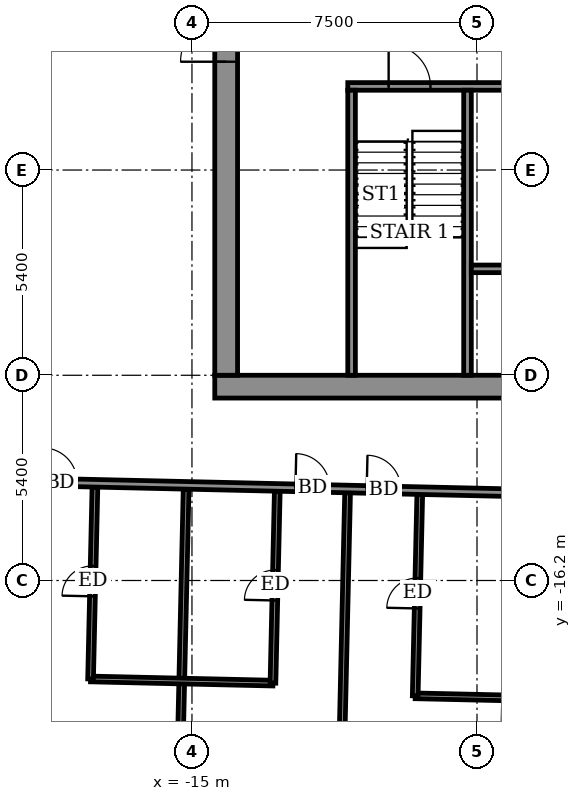
"""IFC4 building model, lengths in metres.
Left out: names, types, materials, properties, quantities, classifications, styles, units other than length and angle.
Written with IfcOpenShell. Run it as: python <this file> out.ifc"""

import sys

from ifc_helpers import new_model, si_unit, direction, frame, frame_2d, origin, place, context, subcontext, project, spatial, rectangle, extrude, element, fill, save


model = new_model("IFC4")
c1 = context("Model", 3, precision=1e-05, world=origin(), true_north=direction((0.0, 1.0)))
c2 = subcontext(c1, "Body", "Model", "MODEL_VIEW")
j1 = project(units=[si_unit("LENGTHUNIT", "METRE"), si_unit("PLANEANGLEUNIT", "RADIAN")], contexts=[c1])
p1 = place(None, origin())
s1 = spatial("IfcSite", under=j1, at=p1, CompositionType="ELEMENT")
p2 = place(p1, origin())
s2 = spatial("IfcBuilding", under=s1, at=p2, CompositionType="ELEMENT")
p3 = place(p2, frame((0.0, 0.0, 306.1)))
s3 = spatial("IfcBuildingStorey", under=s2, at=p3, CompositionType="ELEMENT", Elevation=306.1)
p4 = place(p3, frame((-15.414, -25.244, 0.0), z_axis=(0.0, 0.0, 1.0), x_axis=(0.022706391805, 0.999742176649, 0.0)))
e1 = element("IfcWall", 1, at=p4, inside=s3, PredefinedType="PARTITIONING", context=c2, shape_type="SweptSolid", body=[
    extrude(rectangle(XDim=11.451, YDim=0.15, at=frame_2d((5.726, 0.0))), origin(), (0.0, 0.0, 1.0), 2.5),
])
p5 = place(p3, frame((-11.165, -25.34, 0.0), z_axis=(0.0, 0.0, 1.0), x_axis=(0.022708327922, 0.999742132674, 0.0)))
e2 = element("IfcWall", 2, at=p5, inside=s3, PredefinedType="PARTITIONING", context=c2, shape_type="SweptSolid", body=[
    extrude(rectangle(XDim=11.45, YDim=0.15, at=frame_2d((5.725, 0.0))), origin(), (0.0, 0.0, 1.0), 2.5),
])
p6 = place(p3, frame((-6.866, -25.438, 0.0), z_axis=(0.0, 0.0, 1.0), x_axis=(0.022706391805, 0.999742176649, 0.0)))
e3 = element("IfcWall", 3, at=p6, inside=s3, PredefinedType="PARTITIONING", context=c2, shape_type="SweptSolid", body=[
    extrude(rectangle(XDim=11.451, YDim=0.15, at=frame_2d((5.726, 0.0))), origin(), (0.0, 0.0, 1.0), 2.5),
])
p7 = place(p3, frame((-9.126, -19.235, 0.0), z_axis=(0.0, 0.0, 1.0), x_axis=(0.999749954681, -0.022361308448, 0.0)))
e4 = element("IfcWall", 4, at=p7, inside=s3, PredefinedType="PARTITIONING", context=c2, shape_type="SweptSolid", body=[
    extrude(rectangle(XDim=2.325, YDim=0.15, at=frame_2d((1.163, 0.0))), origin(), (0.0, 0.0, 1.0), 3.05),
])
p8 = place(p3, frame((-9.126, -19.235, 0.0), z_axis=(0.0, 0.0, 1.0), x_axis=(0.022615729912, 0.999744231672, 0.0)))
e5 = element("IfcWall", 5, at=p8, inside=s3, PredefinedType="PARTITIONING", context=c2, shape_type="SweptSolid", body=[
    extrude(rectangle(XDim=5.301, YDim=0.15, at=frame_2d((2.65, 0.0))), origin(), (0.0, 0.0, 1.0), 3.05),
])
p9 = place(p8, frame((2.3, 0.0, 0.0)))
e6 = element("IfcOpeningElement", 6, at=p9, cuts=e5, PredefinedType="OPENING", context=c2, shape_type="SweptSolid", body=[
    extrude(rectangle(XDim=0.8, YDim=2.1, at=frame_2d((0.4, 1.05))), frame((0.0, 0.085, 0.0), z_axis=(0.0, -1.0, 0.0), x_axis=(1.0, 0.0, 0.0)), (0.0, 0.0, 1.0), 0.17),
])
p10 = place(p3, frame((-17.668, -18.791, 0.0), z_axis=(0.0, 0.0, 1.0), x_axis=(0.999742701292, -0.022683280499, 0.0)))
e7 = element("IfcWall", 7, at=p10, inside=s3, PredefinedType="PARTITIONING", context=c2, shape_type="SweptSolid", body=[
    extrude(rectangle(XDim=4.8, YDim=0.15, at=frame_2d((2.4, 0.0))), origin(), (0.0, 0.0, 1.0), 3.05),
])
p11 = place(p3, frame((-17.668, -18.791, 0.0), z_axis=(0.0, 0.0, 1.0), x_axis=(0.022768623305, 0.999740761294, 0.0)))
e8 = element("IfcWall", 8, at=p11, inside=s3, PredefinedType="PARTITIONING", context=c2, shape_type="SweptSolid", body=[
    extrude(rectangle(XDim=5.05, YDim=0.15, at=frame_2d((2.525, 0.0))), origin(), (0.0, 0.0, 1.0), 3.05),
])
p12 = place(p11, frame((2.175, 0.0, 0.0)))
e9 = element("IfcOpeningElement", 9, at=p12, cuts=e8, PredefinedType="OPENING", context=c2, shape_type="SweptSolid", body=[
    extrude(rectangle(XDim=0.8, YDim=2.1, at=frame_2d((0.4, 1.05))), frame((0.0, 0.085, 0.0), z_axis=(0.0, -1.0, 0.0), x_axis=(1.0, 0.0, 0.0)), (0.0, 0.0, 1.0), 0.17),
])
p13 = place(p3, frame((-12.869, -18.9, 0.0), z_axis=(0.0, 0.0, 1.0), x_axis=(0.022576449265, 0.999745119487, 0.0)))
e10 = element("IfcWall", 10, at=p13, inside=s3, PredefinedType="PARTITIONING", context=c2, shape_type="SweptSolid", body=[
    extrude(rectangle(XDim=5.05, YDim=0.15, at=frame_2d((2.525, 0.0))), origin(), (0.0, 0.0, 1.0), 3.05),
])
p14 = place(p13, frame((2.175, 0.0, 0.0)))
e11 = element("IfcOpeningElement", 11, at=p14, cuts=e10, PredefinedType="OPENING", context=c2, shape_type="SweptSolid", body=[
    extrude(rectangle(XDim=0.8, YDim=2.1, at=frame_2d((0.4, 1.05))), frame((0.0, 0.085, 0.0), z_axis=(0.0, -1.0, 0.0), x_axis=(1.0, 0.0, 0.0)), (0.0, 0.0, 1.0), 0.17),
])
p15 = place(p3, frame((-31.347, -13.329, 0.0), z_axis=(0.0, 0.0, 1.0), x_axis=(0.999742613079, -0.022687168058, 0.0)))
e12 = element("IfcWall", 12, at=p15, inside=s3, PredefinedType="PARTITIONING", context=c2, shape_type="SweptSolid", body=[
    extrude(rectangle(XDim=58.799, YDim=0.2, at=frame_2d((29.399, 0.0))), origin(), (0.0, 0.0, 1.0), 3.05),
])
p16 = place(p15, frame((1.35, 0.0, 0.0)))
e13 = element("IfcOpeningElement", 13, at=p16, cuts=e12, PredefinedType="OPENING", context=c2, shape_type="SweptSolid", body=[
    extrude(rectangle(XDim=1.0, YDim=2.1, at=frame_2d((0.5, 1.05))), frame((0.0, 0.11, 0.0), z_axis=(0.0, -1.0, 0.0), x_axis=(1.0, 0.0, 0.0)), (0.0, 0.0, 1.0), 0.22),
])
p17 = place(p15, frame((5.95, 0.0, 0.0)))
e14 = element("IfcOpeningElement", 14, at=p17, cuts=e12, PredefinedType="OPENING", context=c2, shape_type="SweptSolid", body=[
    extrude(rectangle(XDim=0.9, YDim=2.1, at=frame_2d((0.45, 1.05))), frame((0.0, 0.11, 0.0), z_axis=(0.0, -1.0, 0.0), x_axis=(1.0, 0.0, 0.0)), (0.0, 0.0, 1.0), 0.22),
])
p18 = place(p15, frame((10.575, 0.0, 0.0)))
e15 = element("IfcOpeningElement", 15, at=p18, cuts=e12, PredefinedType="OPENING", context=c2, shape_type="SweptSolid", body=[
    extrude(rectangle(XDim=0.9, YDim=2.1, at=frame_2d((0.45, 1.05))), frame((0.0, 0.11, 0.0), z_axis=(0.0, -1.0, 0.0), x_axis=(1.0, 0.0, 0.0)), (0.0, 0.0, 1.0), 0.22),
])
p19 = place(p15, frame((12.425, 0.0, 0.0)))
e16 = element("IfcOpeningElement", 16, at=p19, cuts=e12, PredefinedType="OPENING", context=c2, shape_type="SweptSolid", body=[
    extrude(rectangle(XDim=0.9, YDim=2.1, at=frame_2d((0.45, 1.05))), frame((0.0, 0.11, 0.0), z_axis=(0.0, -1.0, 0.0), x_axis=(1.0, 0.0, 0.0)), (0.0, 0.0, 1.0), 0.22),
])
p20 = place(p15, frame((19.075, 0.0, 0.0)))
e17 = element("IfcOpeningElement", 17, at=p20, cuts=e12, PredefinedType="OPENING", context=c2, shape_type="SweptSolid", body=[
    extrude(rectangle(XDim=0.9, YDim=2.1, at=frame_2d((0.45, 1.05))), frame((0.0, 0.11, 0.0), z_axis=(0.0, -1.0, 0.0), x_axis=(1.0, 0.0, 0.0)), (0.0, 0.0, 1.0), 0.22),
])
p21 = place(p15, frame((20.95, 0.0, 0.0)))
e18 = element("IfcOpeningElement", 18, at=p21, cuts=e12, PredefinedType="OPENING", context=c2, shape_type="SweptSolid", body=[
    extrude(rectangle(XDim=0.9, YDim=2.1, at=frame_2d((0.45, 1.05))), frame((0.0, 0.11, 0.0), z_axis=(0.0, -1.0, 0.0), x_axis=(1.0, 0.0, 0.0)), (0.0, 0.0, 1.0), 0.22),
])
p22 = place(p15, frame((27.625, 0.0, 0.0)))
e19 = element("IfcOpeningElement", 19, at=p22, cuts=e12, PredefinedType="OPENING", context=c2, shape_type="SweptSolid", body=[
    extrude(rectangle(XDim=0.9, YDim=2.1, at=frame_2d((0.45, 1.05))), frame((0.0, 0.11, 0.0), z_axis=(0.0, -1.0, 0.0), x_axis=(1.0, 0.0, 0.0)), (0.0, 0.0, 1.0), 0.22),
])
p23 = place(p15, frame((29.475, 0.0, 0.0)))
e20 = element("IfcOpeningElement", 20, at=p23, cuts=e12, PredefinedType="OPENING", context=c2, shape_type="SweptSolid", body=[
    extrude(rectangle(XDim=0.9, YDim=2.1, at=frame_2d((0.45, 1.05))), frame((0.0, 0.11, 0.0), z_axis=(0.0, -1.0, 0.0), x_axis=(1.0, 0.0, 0.0)), (0.0, 0.0, 1.0), 0.22),
])
p24 = place(p15, frame((36.125, 0.0, 0.0)))
e21 = element("IfcOpeningElement", 21, at=p24, cuts=e12, PredefinedType="OPENING", context=c2, shape_type="SweptSolid", body=[
    extrude(rectangle(XDim=0.9, YDim=2.1, at=frame_2d((0.45, 1.05))), frame((0.0, 0.11, 0.0), z_axis=(0.0, -1.0, 0.0), x_axis=(1.0, 0.0, 0.0)), (0.0, 0.0, 1.0), 0.22),
])
p25 = place(p15, frame((37.95, 0.0, 0.0)))
e22 = element("IfcOpeningElement", 22, at=p25, cuts=e12, PredefinedType="OPENING", context=c2, shape_type="SweptSolid", body=[
    extrude(rectangle(XDim=0.9, YDim=2.1, at=frame_2d((0.45, 1.05))), frame((0.0, 0.11, 0.0), z_axis=(0.0, -1.0, 0.0), x_axis=(1.0, 0.0, 0.0)), (0.0, 0.0, 1.0), 0.22),
])
p26 = place(p15, frame((44.6, 0.0, 0.0)))
e23 = element("IfcOpeningElement", 23, at=p26, cuts=e12, PredefinedType="OPENING", context=c2, shape_type="SweptSolid", body=[
    extrude(rectangle(XDim=0.9, YDim=2.1, at=frame_2d((0.45, 1.05))), frame((0.0, 0.11, 0.0), z_axis=(0.0, -1.0, 0.0), x_axis=(1.0, 0.0, 0.0)), (0.0, 0.0, 1.0), 0.22),
])
p27 = place(p15, frame((46.475, 0.0, 0.0)))
e24 = element("IfcOpeningElement", 24, at=p27, cuts=e12, PredefinedType="OPENING", context=c2, shape_type="SweptSolid", body=[
    extrude(rectangle(XDim=0.9, YDim=2.1, at=frame_2d((0.45, 1.05))), frame((0.0, 0.11, 0.0), z_axis=(0.0, -1.0, 0.0), x_axis=(1.0, 0.0, 0.0)), (0.0, 0.0, 1.0), 0.22),
])
p28 = place(p15, frame((55.925, 0.0, 0.0)))
e25 = element("IfcOpeningElement", 25, at=p28, cuts=e12, PredefinedType="OPENING", context=c2, shape_type="SweptSolid", body=[
    extrude(rectangle(XDim=1.0, YDim=2.1, at=frame_2d((0.5, 1.05))), frame((0.0, 0.11, 0.0), z_axis=(0.0, -1.0, 0.0), x_axis=(1.0, 0.0, 0.0)), (0.0, 0.0, 1.0), 0.22),
])
p29 = place(p15, frame((51.0, 0.0, 0.0)))
e26 = element("IfcOpeningElement", 26, at=p29, cuts=e12, PredefinedType="OPENING", context=c2, shape_type="SweptSolid", body=[
    extrude(rectangle(XDim=0.9, YDim=2.1, at=frame_2d((0.45, 1.05))), frame((0.0, 0.11, 0.0), z_axis=(0.0, -1.0, 0.0), x_axis=(1.0, 0.0, 0.0)), (0.0, 0.0, 1.0), 0.22),
])
p30 = place(p3, frame((-14.4, -11.1, 0.0), z_axis=(0.0, 0.0, 1.0), x_axis=(1.0, 0.0, 0.0)))
e27 = element("IfcWall", 27, at=p30, inside=s3, PredefinedType="SHEAR", context=c2, shape_type="SweptSolid", body=[
    extrude(rectangle(XDim=28.8, YDim=0.6, at=frame_2d((14.4, 0.0))), origin(), (0.0, 0.0, 1.0), 3.6),
])
p31 = place(p3, frame((-14.1, -10.8, 0.0), z_axis=(0.0, 0.0, 1.0), x_axis=(0.0, 1.0, 0.0)))
e28 = element("IfcWall", 28, at=p31, inside=s3, PredefinedType="SHEAR", context=c2, shape_type="SweptSolid", body=[
    extrude(rectangle(XDim=21.6, YDim=0.6, at=frame_2d((10.8, 0.0))), origin(), (0.0, 0.0, 1.0), 3.6),
])
p32 = place(p31, frame((8.25, 0.0, 0.0)))
e29 = element("IfcOpeningElement", 29, at=p32, cuts=e28, PredefinedType="OPENING", context=c2, shape_type="SweptSolid", body=[
    extrude(rectangle(XDim=1.2, YDim=2.1, at=frame_2d((0.6, 1.05))), frame((0.0, 0.31, 0.0), z_axis=(0.0, -1.0, 0.0), x_axis=(1.0, 0.0, 0.0)), (0.0, 0.0, 1.0), 0.62),
])
p33 = place(p31, frame((15.25, 0.0, 0.0)))
e30 = element("IfcOpeningElement", 30, at=p33, cuts=e28, PredefinedType="OPENING", context=c2, shape_type="SweptSolid", body=[
    extrude(rectangle(XDim=1.2, YDim=2.1, at=frame_2d((0.6, 1.05))), frame((0.0, 0.31, 0.0), z_axis=(0.0, -1.0, 0.0), x_axis=(1.0, 0.0, 0.0)), (0.0, 0.0, 1.0), 0.62),
])
p34 = place(p3, frame((-10.9, -3.2, 0.0), z_axis=(0.0, 0.0, 1.0), x_axis=(1.0, 0.0, 0.0)))
e31 = element("IfcWall", 31, at=p34, inside=s3, PredefinedType="SHEAR", context=c2, shape_type="SweptSolid", body=[
    extrude(rectangle(XDim=21.8, YDim=0.2, at=frame_2d((10.9, 0.0))), origin(), (0.0, 0.0, 1.0), 3.05),
])
p35 = place(p34, frame((1.075, 0.0, 0.0)))
e32 = element("IfcOpeningElement", 32, at=p35, cuts=e31, PredefinedType="OPENING", context=c2, shape_type="SweptSolid", body=[
    extrude(rectangle(XDim=1.1, YDim=2.1, at=frame_2d((0.55, 1.05))), frame((0.0, 0.11, 0.0), z_axis=(0.0, -1.0, 0.0), x_axis=(1.0, 0.0, 0.0)), (0.0, 0.0, 1.0), 0.22),
])
p36 = place(p34, frame((10.325, 0.0, 0.0)))
e33 = element("IfcOpeningElement", 33, at=p36, cuts=e31, PredefinedType="OPENING", context=c2, shape_type="SweptSolid", body=[
    extrude(rectangle(XDim=1.1, YDim=2.1, at=frame_2d((0.55, 1.05))), frame((0.0, 0.11, 0.0), z_axis=(0.0, -1.0, 0.0), x_axis=(1.0, 0.0, 0.0)), (0.0, 0.0, 1.0), 0.22),
])
p37 = place(p34, frame((19.625, 0.0, 0.0)))
e34 = element("IfcOpeningElement", 34, at=p37, cuts=e31, PredefinedType="OPENING", context=c2, shape_type="SweptSolid", body=[
    extrude(rectangle(XDim=1.1, YDim=2.1, at=frame_2d((0.55, 1.05))), frame((0.0, 0.11, 0.0), z_axis=(0.0, -1.0, 0.0), x_axis=(1.0, 0.0, 0.0)), (0.0, 0.0, 1.0), 0.22),
])
p38 = place(p34, frame((5.7, 0.0, 0.0)))
e35 = element("IfcOpeningElement", 35, at=p38, cuts=e31, PredefinedType="OPENING", context=c2, shape_type="SweptSolid", body=[
    extrude(rectangle(XDim=1.1, YDim=2.1, at=frame_2d((0.55, 1.05))), frame((0.0, 0.11, 0.0), z_axis=(0.0, -1.0, 0.0), x_axis=(1.0, 0.0, 0.0)), (0.0, 0.0, 1.0), 0.22),
])
p39 = place(p34, frame((14.975, 0.0, 0.0)))
e36 = element("IfcOpeningElement", 36, at=p39, cuts=e31, PredefinedType="OPENING", context=c2, shape_type="SweptSolid", body=[
    extrude(rectangle(XDim=1.1, YDim=2.1, at=frame_2d((0.55, 1.05))), frame((0.0, 0.11, 0.0), z_axis=(0.0, -1.0, 0.0), x_axis=(1.0, 0.0, 0.0)), (0.0, 0.0, 1.0), 0.22),
])
for number, where, z_axis, x_axis in (
    (37, (-10.8, -10.8, 0.0), (0.0, 0.0, 1.0), (0.0, 1.0, 0.0)),
    (38, (-7.75, -10.8, 0.0), (0.0, 0.0, 1.0), (0.0, 1.0, 0.0)),
):
    element("IfcWall", number, at=place(p3, frame(where, z_axis=z_axis, x_axis=x_axis)), inside=s3, PredefinedType="SHEAR", context=c2, shape_type="SweptSolid", body=[
        extrude(rectangle(XDim=7.5, YDim=0.2, at=frame_2d((3.75, 0.0))), origin(), (0.0, 0.0, 1.0), 3.05),
    ])
p40 = place(p3, frame((-7.65, -8.0, 0.0), z_axis=(0.0, 0.0, 1.0), x_axis=(1.0, 0.0, 0.0)))
e39 = element("IfcWall", 39, at=p40, inside=s3, PredefinedType="SHEAR", context=c2, shape_type="SweptSolid", body=[
    extrude(rectangle(XDim=6.0, YDim=0.2, at=frame_2d((3.0, 0.0))), origin(), (0.0, 0.0, 1.0), 3.05),
])
p41 = place(p40, frame((0.9, 0.0, 0.0)))
e40 = element("IfcOpeningElement", 40, at=p41, cuts=e39, PredefinedType="OPENING", context=c2, shape_type="SweptSolid", body=[
    extrude(rectangle(XDim=1.1, YDim=2.1, at=frame_2d((0.55, 1.05))), frame((0.0, 0.11, 0.0), z_axis=(0.0, -1.0, 0.0), x_axis=(1.0, 0.0, 0.0)), (0.0, 0.0, 1.0), 0.22),
])
p42 = place(p40, frame((4.0, 0.0, 0.0)))
e41 = element("IfcOpeningElement", 41, at=p42, cuts=e39, PredefinedType="OPENING", context=c2, shape_type="SweptSolid", body=[
    extrude(rectangle(XDim=1.1, YDim=2.1, at=frame_2d((0.55, 1.05))), frame((0.0, 0.11, 0.0), z_axis=(0.0, -1.0, 0.0), x_axis=(1.0, 0.0, 0.0)), (0.0, 0.0, 1.0), 0.22),
])
p43 = place(p19, origin())
e42 = element("IfcDoor", 42, at=p43, inside=s3, OperationType="SINGLE_SWING_RIGHT", PredefinedType="DOOR", context=c2, shape_type="SweptSolid", body=[
    extrude(rectangle(XDim=0.9, YDim=2.1, at=frame_2d((0.45, 1.05))), frame((0.0, 0.025, 0.0), z_axis=(0.0, -1.0, 0.0), x_axis=(1.0, 0.0, 0.0)), (0.0, 0.0, 1.0), 0.05),
])
fill(e16, e42)
p44 = place(p12, origin())
e43 = element("IfcDoor", 43, at=p44, inside=s3, OperationType="SINGLE_SWING_RIGHT", PredefinedType="DOOR", context=c2, shape_type="SweptSolid", body=[
    extrude(rectangle(XDim=0.8, YDim=2.1, at=frame_2d((0.4, 1.05))), frame((0.0, 0.025, 0.0), z_axis=(0.0, -1.0, 0.0), x_axis=(1.0, 0.0, 0.0)), (0.0, 0.0, 1.0), 0.05),
])
fill(e9, e43)
p45 = place(p20, origin())
e44 = element("IfcDoor", 44, at=p45, inside=s3, OperationType="SINGLE_SWING_LEFT", PredefinedType="DOOR", context=c2, shape_type="SweptSolid", body=[
    extrude(rectangle(XDim=0.9, YDim=2.1, at=frame_2d((0.45, 1.05))), frame((0.0, 0.025, 0.0), z_axis=(0.0, -1.0, 0.0), x_axis=(1.0, 0.0, 0.0)), (0.0, 0.0, 1.0), 0.05),
])
fill(e17, e44)
p46 = place(p14, origin())
e45 = element("IfcDoor", 45, at=p46, inside=s3, OperationType="SINGLE_SWING_LEFT", PredefinedType="DOOR", context=c2, shape_type="SweptSolid", body=[
    extrude(rectangle(XDim=0.8, YDim=2.1, at=frame_2d((0.4, 1.05))), frame((0.0, 0.025, 0.0), z_axis=(0.0, -1.0, 0.0), x_axis=(1.0, 0.0, 0.0)), (0.0, 0.0, 1.0), 0.05),
])
fill(e11, e45)
p47 = place(p21, origin())
e46 = element("IfcDoor", 46, at=p47, inside=s3, OperationType="SINGLE_SWING_RIGHT", PredefinedType="DOOR", context=c2, shape_type="SweptSolid", body=[
    extrude(rectangle(XDim=0.9, YDim=2.1, at=frame_2d((0.45, 1.05))), frame((0.0, 0.025, 0.0), z_axis=(0.0, -1.0, 0.0), x_axis=(1.0, 0.0, 0.0)), (0.0, 0.0, 1.0), 0.05),
])
fill(e18, e46)
p48 = place(p9, origin())
e47 = element("IfcDoor", 47, at=p48, inside=s3, OperationType="SINGLE_SWING_RIGHT", PredefinedType="DOOR", context=c2, shape_type="SweptSolid", body=[
    extrude(rectangle(XDim=0.8, YDim=2.1, at=frame_2d((0.4, 1.05))), frame((0.0, 0.025, 0.0), z_axis=(0.0, -1.0, 0.0), x_axis=(1.0, 0.0, 0.0)), (0.0, 0.0, 1.0), 0.05),
])
fill(e6, e47)
p49 = place(p32, origin())
e48 = element("IfcDoor", 48, at=p49, inside=s3, OperationType="DOUBLE_DOOR_SINGLE_SWING", PredefinedType="DOOR", context=c2, shape_type="SweptSolid", body=[
    extrude(rectangle(XDim=1.2, YDim=2.1, at=frame_2d((0.6, 1.05))), frame((0.0, 0.025, 0.0), z_axis=(0.0, -1.0, 0.0), x_axis=(1.0, 0.0, 0.0)), (0.0, 0.0, 1.0), 0.05),
])
fill(e29, e48)
p50 = place(p35, origin())
e49 = element("IfcDoor", 49, at=p50, inside=s3, OperationType="SINGLE_SWING_RIGHT", PredefinedType="DOOR", context=c2, shape_type="SweptSolid", body=[
    extrude(rectangle(XDim=1.1, YDim=2.1, at=frame_2d((0.55, 1.05))), frame((0.0, 0.025, 0.0), z_axis=(0.0, -1.0, 0.0), x_axis=(1.0, 0.0, 0.0)), (0.0, 0.0, 1.0), 0.05),
])
fill(e32, e49)
save(model, sys.argv[1])
